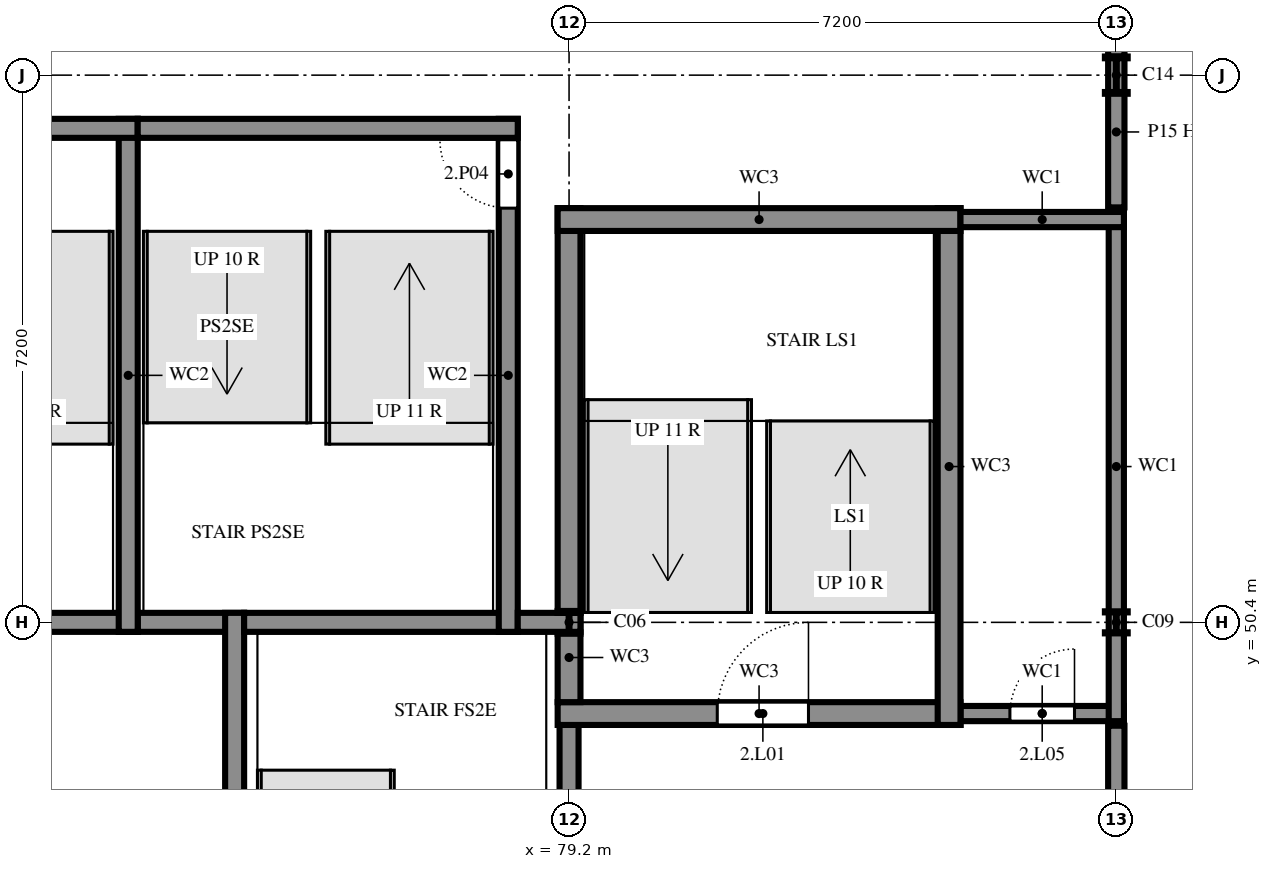
"""IFC4 building model, lengths in metres.
Left out: names, types, materials, properties, quantities, classifications, styles, units other than length and angle.
Written with IfcOpenShell. Run it as: python <this file> out.ifc"""

import sys

from ifc_helpers import new_model, si_unit, direction, frame, frame_2d, origin, origin_2d, place, context, subcontext, project, spatial, rectangle, i_section, extrude, element, fill, save


model = new_model("IFC4")
c1 = context("Model", 3, precision=1e-05, world=origin(), true_north=direction((0.0, 1.0)))
c2 = subcontext(c1, "Body", "Model", "MODEL_VIEW")
j1 = project(units=[si_unit("LENGTHUNIT", "METRE"), si_unit("PLANEANGLEUNIT", "RADIAN")], contexts=[c1])
p1 = place(None, origin())
s1 = spatial("IfcSite", under=j1, at=p1, CompositionType="ELEMENT")
p2 = place(p1, origin())
s2 = spatial("IfcBuilding", under=s1, at=p2, CompositionType="ELEMENT")
p3 = place(p2, frame((0.0, 0.0, 7.2)))
s3 = spatial("IfcBuildingStorey", under=s2, at=p3, CompositionType="ELEMENT", Elevation=7.2)
p4 = place(p3, frame((79.2, 50.4, 0.0), z_axis=(0.0, 0.0, 1.0), x_axis=(1.0, 0.0, 0.0)))
e1 = element("IfcColumn", 1, at=p4, inside=s3, PredefinedType="COLUMN", context=c2, shape_type="SweptSolid", body=[
    extrude(i_section(OverallWidth=0.3, OverallDepth=0.3, WebThickness=0.011, FlangeThickness=0.019, FilletRadius=0.027, at=origin_2d()), origin(), (0.0, 0.0, 1.0), 3.6),
])
p5 = place(p3, frame((86.4, 50.4, 0.0), z_axis=(0.0, 0.0, 1.0), x_axis=(1.0, 0.0, 0.0)))
e2 = element("IfcColumn", 2, at=p5, inside=s3, PredefinedType="COLUMN", context=c2, shape_type="SweptSolid", body=[
    extrude(i_section(OverallWidth=0.3, OverallDepth=0.29, WebThickness=0.009, FlangeThickness=0.014, FilletRadius=0.027, at=origin_2d()), origin(), (0.0, 0.0, 1.0), 3.6),
])
p6 = place(p3, frame((86.4, 57.6, 0.0), z_axis=(0.0, 0.0, 1.0), x_axis=(1.0, 0.0, 0.0)))
e3 = element("IfcColumn", 3, at=p6, inside=s3, PredefinedType="COLUMN", context=c2, shape_type="SweptSolid", body=[
    extrude(i_section(OverallWidth=0.3, OverallDepth=0.49, WebThickness=0.012, FlangeThickness=0.023, FilletRadius=0.027, at=origin_2d()), origin(), (0.0, 0.0, 1.0), 3.6),
])
p7 = place(p3, frame((79.2, 44.275, 0.0), z_axis=(0.0, 0.0, 1.0), x_axis=(0.0, 1.0, 0.0)))
e4 = element("IfcWall", 4, at=p7, inside=s3, PredefinedType="SHEAR", context=c2, shape_type="SweptSolid", body=[
    extrude(rectangle(XDim=5.075, YDim=0.25, at=frame_2d((2.538, 0.0))), origin(), (0.0, 0.0, 1.0), 3.6),
])
p8 = place(p3, frame((79.05, 49.2, 0.0), z_axis=(0.0, 0.0, 1.0), x_axis=(1.0, 0.0, 0.0)))
e5 = element("IfcWall", 5, at=p8, inside=s3, PredefinedType="SHEAR", context=c2, shape_type="SweptSolid", body=[
    extrude(rectangle(XDim=5.3, YDim=0.3, at=frame_2d((2.65, 0.0))), origin(), (0.0, 0.0, 1.0), 3.6),
])
p9 = place(p8, frame((2.1, 0.0, 0.0)))
e6 = element("IfcOpeningElement", 6, at=p9, cuts=e5, PredefinedType="OPENING", context=c2, shape_type="SweptSolid", body=[
    extrude(rectangle(XDim=1.2, YDim=2.4, at=frame_2d((0.6, 1.2))), frame((0.0, 0.16, 0.0), z_axis=(0.0, -1.0, 0.0), x_axis=(1.0, 0.0, 0.0)), (0.0, 0.0, 1.0), 0.32),
])
p10 = place(p3, frame((79.2, 49.35, 0.0), z_axis=(0.0, 0.0, 1.0), x_axis=(0.0, 1.0, 0.0)))
e7 = element("IfcWall", 7, at=p10, inside=s3, PredefinedType="SHEAR", context=c2, shape_type="SweptSolid", body=[
    extrude(rectangle(XDim=1.175, YDim=0.3, at=frame_2d((0.587, 0.0))), origin(), (0.0, 0.0, 1.0), 3.6),
])
p11 = place(p3, frame((84.35, 49.2, 0.0), z_axis=(0.0, 0.0, 1.0), x_axis=(1.0, 0.0, 0.0)))
e8 = element("IfcWall", 8, at=p11, inside=s3, PredefinedType="SHEAR", context=c2, shape_type="SweptSolid", body=[
    extrude(rectangle(XDim=2.15, YDim=0.2, at=frame_2d((1.075, 0.0))), origin(), (0.0, 0.0, 1.0), 3.6),
])
p12 = place(p11, frame((0.65, 0.0, 0.0)))
e9 = element("IfcOpeningElement", 9, at=p12, cuts=e8, PredefinedType="OPENING", context=c2, shape_type="SweptSolid", body=[
    extrude(rectangle(XDim=0.85, YDim=2.1, at=frame_2d((0.425, 1.05))), frame((0.0, 0.11, 0.0), z_axis=(0.0, -1.0, 0.0), x_axis=(1.0, 0.0, 0.0)), (0.0, 0.0, 1.0), 0.22),
])
p13 = place(p3, frame((84.2, 49.05, 0.0), z_axis=(0.0, 0.0, 1.0), x_axis=(0.0, 1.0, 0.0)))
e10 = element("IfcWall", 10, at=p13, inside=s3, PredefinedType="SHEAR", context=c2, shape_type="SweptSolid", body=[
    extrude(rectangle(XDim=6.8, YDim=0.3, at=frame_2d((3.4, 0.0))), origin(), (0.0, 0.0, 1.0), 3.6),
])
p14 = place(p3, frame((86.4, 49.1, 0.0), z_axis=(0.0, 0.0, 1.0), x_axis=(0.0, 1.0, 0.0)))
e11 = element("IfcWall", 11, at=p14, inside=s3, PredefinedType="SHEAR", context=c2, shape_type="SweptSolid", body=[
    extrude(rectangle(XDim=6.7, YDim=0.2, at=frame_2d((3.35, 0.0))), origin(), (0.0, 0.0, 1.0), 3.6),
])
p15 = place(p3, frame((68.275, 50.4, 0.0), z_axis=(0.0, 0.0, 1.0), x_axis=(1.0, 0.0, 0.0)))
e12 = element("IfcWall", 12, at=p15, inside=s3, PredefinedType="SHEAR", context=c2, shape_type="SweptSolid", body=[
    extrude(rectangle(XDim=5.25, YDim=0.25, at=frame_2d((2.625, 0.0))), origin(), (0.0, 0.0, 1.0), 3.6),
])
p16 = place(p3, frame((73.525, 50.4, 0.0), z_axis=(0.0, 0.0, 1.0), x_axis=(1.0, 0.0, 0.0)))
e13 = element("IfcWall", 13, at=p16, inside=s3, PredefinedType="SHEAR", context=c2, shape_type="SweptSolid", body=[
    extrude(rectangle(XDim=1.4, YDim=0.25, at=frame_2d((0.7, 0.0))), origin(), (0.0, 0.0, 1.0), 3.6),
])
p17 = place(p3, frame((73.4, 50.275, 0.0), z_axis=(0.0, 0.0, 1.0), x_axis=(0.0, 1.0, 0.0)))
e14 = element("IfcWall", 14, at=p17, inside=s3, PredefinedType="SHEAR", context=c2, shape_type="SweptSolid", body=[
    extrude(rectangle(XDim=6.75, YDim=0.25, at=frame_2d((3.375, 0.0))), origin(), (0.0, 0.0, 1.0), 3.6),
])
p18 = place(p3, frame((74.8, 50.525, 0.0), z_axis=(0.0, 0.0, 1.0), x_axis=(0.0, -1.0, 0.0)))
e15 = element("IfcWall", 15, at=p18, inside=s3, PredefinedType="SHEAR", context=c2, shape_type="SweptSolid", body=[
    extrude(rectangle(XDim=6.25, YDim=0.25, at=frame_2d((3.125, 0.0))), origin(), (0.0, 0.0, 1.0), 3.6),
])
p19 = place(p18, frame((4.875, 0.0, 0.0)))
e16 = element("IfcOpeningElement", 16, at=p19, cuts=e15, PredefinedType="OPENING", context=c2, shape_type="SweptSolid", body=[
    extrude(rectangle(XDim=1.0, YDim=2.4, at=frame_2d((0.5, 1.2))), frame((0.0, 0.135, 0.0), z_axis=(0.0, -1.0, 0.0), x_axis=(1.0, 0.0, 0.0)), (0.0, 0.0, 1.0), 0.27),
])
p20 = place(p3, frame((78.525, 50.4, 0.0), z_axis=(0.0, 0.0, 1.0), x_axis=(-1.0, 0.0, 0.0)))
e17 = element("IfcWall", 17, at=p20, inside=s3, PredefinedType="SHEAR", context=c2, shape_type="SweptSolid", body=[
    extrude(rectangle(XDim=3.6, YDim=0.25, at=frame_2d((1.8, 0.0))), origin(), (0.0, 0.0, 1.0), 3.6),
])
p21 = place(p3, frame((78.4, 50.275, 0.0), z_axis=(0.0, 0.0, 1.0), x_axis=(0.0, 1.0, 0.0)))
e18 = element("IfcWall", 18, at=p21, inside=s3, PredefinedType="SHEAR", context=c2, shape_type="SweptSolid", body=[
    extrude(rectangle(XDim=6.75, YDim=0.25, at=frame_2d((3.375, 0.0))), origin(), (0.0, 0.0, 1.0), 3.6),
])
p22 = place(p21, frame((5.575, 0.0, 0.0)))
e19 = element("IfcOpeningElement", 19, at=p22, cuts=e18, PredefinedType="OPENING", context=c2, shape_type="SweptSolid", body=[
    extrude(rectangle(XDim=0.9, YDim=2.1, at=frame_2d((0.45, 1.05))), frame((0.0, 0.135, 0.0), z_axis=(0.0, -1.0, 0.0), x_axis=(1.0, 0.0, 0.0)), (0.0, 0.0, 1.0), 0.27),
])
p23 = place(p3, frame((79.35, 50.4, 0.0), z_axis=(0.0, 0.0, 1.0), x_axis=(-1.0, 0.0, 0.0)))
e20 = element("IfcWall", 20, at=p23, inside=s3, PredefinedType="SHEAR", context=c2, shape_type="SweptSolid", body=[
    extrude(rectangle(XDim=0.825, YDim=0.25, at=frame_2d((0.413, 0.0))), origin(), (0.0, 0.0, 1.0), 3.6),
])
p24 = place(p3, frame((79.2, 55.85, 0.0), z_axis=(0.0, 0.0, 1.0), x_axis=(0.0, -1.0, 0.0)))
e21 = element("IfcWall", 21, at=p24, inside=s3, PredefinedType="SHEAR", context=c2, shape_type="SweptSolid", body=[
    extrude(rectangle(XDim=5.325, YDim=0.3, at=frame_2d((2.663, 0.0))), origin(), (0.0, 0.0, 1.0), 3.6),
])
p25 = place(p3, frame((84.35, 55.7, 0.0), z_axis=(0.0, 0.0, 1.0), x_axis=(-1.0, 0.0, 0.0)))
e22 = element("IfcWall", 22, at=p25, inside=s3, PredefinedType="SHEAR", context=c2, shape_type="SweptSolid", body=[
    extrude(rectangle(XDim=5.3, YDim=0.3, at=frame_2d((2.65, 0.0))), origin(), (0.0, 0.0, 1.0), 3.6),
])
p26 = place(p3, frame((86.5, 55.7, 0.0), z_axis=(0.0, 0.0, 1.0), x_axis=(-1.0, 0.0, 0.0)))
e23 = element("IfcWall", 23, at=p26, inside=s3, PredefinedType="SHEAR", context=c2, shape_type="SweptSolid", body=[
    extrude(rectangle(XDim=2.15, YDim=0.2, at=frame_2d((1.075, 0.0))), origin(), (0.0, 0.0, 1.0), 3.6),
])
p27 = place(p3, frame((73.525, 56.9, 0.0), z_axis=(0.0, 0.0, 1.0), x_axis=(-1.0, 0.0, 0.0)))
e24 = element("IfcWall", 24, at=p27, inside=s3, PredefinedType="SHEAR", context=c2, shape_type="SweptSolid", body=[
    extrude(rectangle(XDim=5.25, YDim=0.25, at=frame_2d((2.625, 0.0))), origin(), (0.0, 0.0, 1.0), 3.6),
])
p28 = place(p27, frame((2.575, 0.0, 0.0)))
e25 = element("IfcOpeningElement", 25, at=p28, cuts=e24, PredefinedType="OPENING", context=c2, shape_type="SweptSolid", body=[
    extrude(rectangle(XDim=1.2, YDim=2.4, at=frame_2d((0.6, 1.2))), frame((0.0, 0.135, 0.0), z_axis=(0.0, -1.0, 0.0), x_axis=(1.0, 0.0, 0.0)), (0.0, 0.0, 1.0), 0.27),
])
p29 = place(p3, frame((78.525, 56.9, 0.0), z_axis=(0.0, 0.0, 1.0), x_axis=(-1.0, 0.0, 0.0)))
e26 = element("IfcWall", 26, at=p29, inside=s3, PredefinedType="SHEAR", context=c2, shape_type="SweptSolid", body=[
    extrude(rectangle(XDim=5.0, YDim=0.25, at=frame_2d((2.5, 0.0))), origin(), (0.0, 0.0, 1.0), 3.6),
])
p30 = place(p3, frame((86.4, 43.48, 0.0), z_axis=(0.0, 0.0, 1.0), x_axis=(0.0, 1.0, 0.0)))
e27 = element("IfcWall", 27, at=p30, inside=s3, PredefinedType="PARTITIONING", context=c2, shape_type="SweptSolid", body=[
    extrude(rectangle(XDim=5.56, YDim=0.215, at=frame_2d((2.78, 0.0))), origin(), (0.0, 0.0, 1.0), 3.15),
])
p31 = place(p3, frame((86.4, 55.86, 0.0), z_axis=(0.0, 0.0, 1.0), x_axis=(0.0, 1.0, 0.0)))
e28 = element("IfcWall", 28, at=p31, inside=s3, PredefinedType="PARTITIONING", context=c2, shape_type="SweptSolid", body=[
    extrude(rectangle(XDim=1.985, YDim=0.215, at=frame_2d((0.992, 0.0))), origin(), (0.0, 0.0, 1.0), 3.6),
])
p32 = place(p3, frame((86.4, 57.845, 0.0), z_axis=(0.0, 0.0, 1.0), x_axis=(0.0, 1.0, 0.0)))
e29 = element("IfcWall", 29, at=p32, inside=s3, PredefinedType="PARTITIONING", context=c2, shape_type="SweptSolid", body=[
    extrude(rectangle(XDim=6.71, YDim=0.215, at=frame_2d((3.355, 0.0))), origin(), (0.0, 0.0, 1.0), 3.12),
])
p33 = place(p22, origin())
e30 = element("IfcDoor", 30, at=p33, inside=s3, OperationType="SINGLE_SWING_LEFT", PredefinedType="DOOR", context=c2, shape_type="SweptSolid", body=[
    extrude(rectangle(XDim=0.9, YDim=2.1, at=frame_2d((0.45, 1.05))), frame((0.0, 0.025, 0.0), z_axis=(0.0, -1.0, 0.0), x_axis=(1.0, 0.0, 0.0)), (0.0, 0.0, 1.0), 0.05),
])
fill(e19, e30)
p34 = place(p9, origin())
e31 = element("IfcDoor", 31, at=p34, inside=s3, OperationType="SINGLE_SWING_LEFT", PredefinedType="DOOR", context=c2, shape_type="SweptSolid", body=[
    extrude(rectangle(XDim=1.2, YDim=2.4, at=frame_2d((0.6, 1.2))), frame((0.0, 0.025, 0.0), z_axis=(0.0, -1.0, 0.0), x_axis=(1.0, 0.0, 0.0)), (0.0, 0.0, 1.0), 0.05),
])
fill(e6, e31)
p35 = place(p12, origin())
e32 = element("IfcDoor", 32, at=p35, inside=s3, OperationType="SINGLE_SWING_LEFT", PredefinedType="DOOR", context=c2, shape_type="SweptSolid", body=[
    extrude(rectangle(XDim=0.85, YDim=2.1, at=frame_2d((0.425, 1.05))), frame((0.0, 0.025, 0.0), z_axis=(0.0, -1.0, 0.0), x_axis=(1.0, 0.0, 0.0)), (0.0, 0.0, 1.0), 0.05),
])
fill(e9, e32)
save(model, sys.argv[1])
